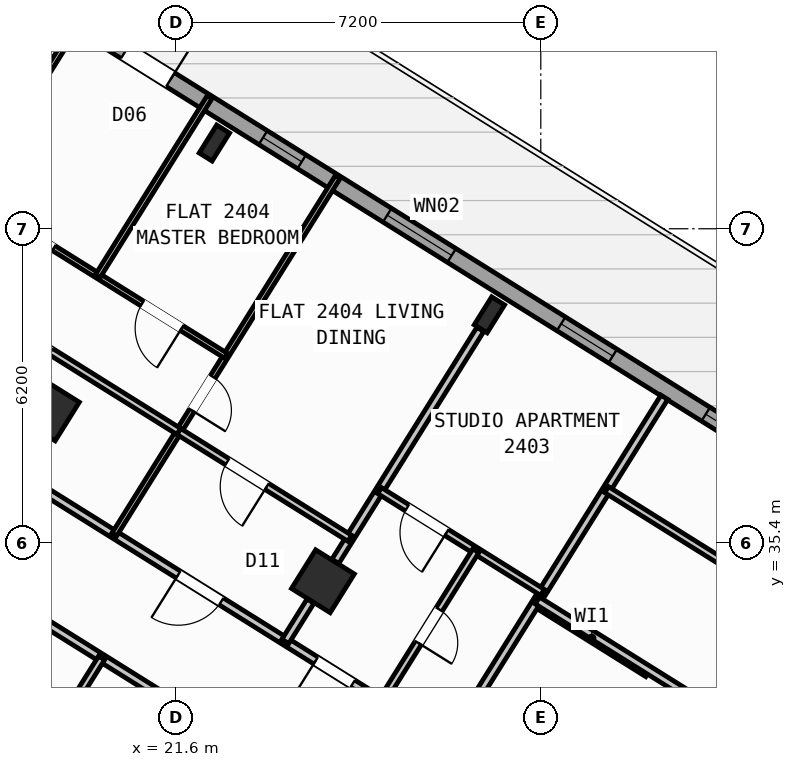
"""IFC4 building model, lengths in metres.
Left out: names, types, materials, properties, quantities, classifications, styles, units other than length and angle.
Written with IfcOpenShell. Run it as: python <this file> out.ifc"""

import sys

from ifc_helpers import new_model, si_unit, direction, frame, frame_2d, origin, origin_2d, place, context, subcontext, project, spatial, rectangle, hollow_rectangle, i_section, extrude, source, transform, mapped, element, fill, save


model = new_model("IFC4")
c1 = context("Model", 3, precision=1e-05, world=origin(), true_north=direction((0.0, 1.0)))
c2 = subcontext(c1, "Body", "Model", "MODEL_VIEW")
j1 = project(units=[si_unit("LENGTHUNIT", "METRE"), si_unit("PLANEANGLEUNIT", "RADIAN")], contexts=[c1])
p1 = place(None, origin())
s1 = spatial("IfcSite", under=j1, at=p1, CompositionType="ELEMENT")
p2 = place(p1, origin())
s2 = spatial("IfcBuilding", under=s1, at=p2, CompositionType="ELEMENT")
p3 = place(p2, frame((0.0, 0.0, 97.2)))
s3 = spatial("IfcBuildingStorey", under=s2, at=p3, CompositionType="ELEMENT", Elevation=97.2)
m1 = source(origin(), c2, "Body", "SweptSolid", [
    extrude(i_section(OverallWidth=0.3, OverallDepth=0.65, WebThickness=0.016, FlangeThickness=0.031, at=origin_2d()), origin(), (0.0, 0.0, 1.0), 3.6),
])
p4 = place(p3, frame((27.786, 39.901, 0.0), z_axis=(0.0, 0.0, 1.0), x_axis=(-0.848048096156, 0.529919264233, 0.0)))
e1 = element("IfcColumn", 1, at=p4, inside=s3, PredefinedType="COLUMN", context=c2, shape_type="MappedRepresentation", body=[
    mapped(m1, transform((0.0, 0.0, 0.0), scale=1.0)),
])
m2 = source(origin(), c2, "Body", "SweptSolid", [
    extrude(hollow_rectangle(XDim=0.9, YDim=0.9, WallThickness=0.036, at=origin_2d()), origin(), (0.0, 0.0, 1.0), 3.6),
])
p5 = place(p3, frame((24.5, 34.643, 0.0), z_axis=(0.0, 0.0, 1.0), x_axis=(-0.848048096156, 0.529919264233, 0.0)))
e2 = element("IfcColumn", 2, at=p5, inside=s3, PredefinedType="COLUMN", context=c2, shape_type="MappedRepresentation", body=[
    mapped(m2, transform((0.0, 0.0, 0.0), scale=1.0)),
])
p6 = place(p3, frame((22.358, 43.292, 0.0), z_axis=(0.0, 0.0, 1.0), x_axis=(-0.848048096156, 0.529919264233, 0.0)))
e3 = element("IfcColumn", 3, at=p6, inside=s3, PredefinedType="COLUMN", context=c2, shape_type="MappedRepresentation", body=[
    mapped(m1, transform((0.0, 0.0, 0.0), scale=1.0)),
])
p7 = place(p3, frame((19.073, 38.034, 0.0), z_axis=(0.0, 0.0, 1.0), x_axis=(-0.848048096156, 0.529919264233, 0.0)))
e4 = element("IfcColumn", 4, at=p7, inside=s3, PredefinedType="COLUMN", context=c2, shape_type="MappedRepresentation", body=[
    mapped(m2, transform((0.0, 0.0, 0.0), scale=1.0)),
])
p8 = place(p3, frame((17.424, 47.083, 0.0), z_axis=(0.0, 0.0, 1.0), x_axis=(0.848049927979, -0.529916332693, 0.0)))
e5 = element("IfcWall", 5, at=p8, inside=s3, PredefinedType="STANDARD", context=c2, shape_type="SweptSolid", body=[
    extrude(rectangle(XDim=29.223, YDim=0.32, at=frame_2d((14.612, 0.0))), origin(), (0.0, 0.0, 1.0), 3.32),
])
p9 = place(p8, frame((3.745, 0.0, 0.0)))
e6 = element("IfcOpeningElement", 6, at=p9, cuts=e5, PredefinedType="OPENING", context=c2, shape_type="SweptSolid", body=[
    extrude(rectangle(XDim=1.05, YDim=2.15, at=frame_2d((0.525, 1.075))), frame((0.0, 0.17, 0.0), z_axis=(0.0, -1.0, 0.0), x_axis=(1.0, 0.0, 0.0)), (0.0, 0.0, 1.0), 0.34),
])
p10 = place(p8, frame((0.699, 0.0, 0.95)))
e7 = element("IfcOpeningElement", 7, at=p10, cuts=e5, PredefinedType="OPENING", context=c2, shape_type="SweptSolid", body=[
    extrude(rectangle(XDim=1.2, YDim=1.4, at=frame_2d((0.6, 0.7))), frame((0.0, 0.17, 0.0), z_axis=(0.0, -1.0, 0.0), x_axis=(1.0, 0.0, 0.0)), (0.0, 0.0, 1.0), 0.34),
])
p11 = place(p8, frame((6.951, 0.0, 1.0)))
e8 = element("IfcOpeningElement", 8, at=p11, cuts=e5, PredefinedType="OPENING", context=c2, shape_type="SweptSolid", body=[
    extrude(rectangle(XDim=0.9, YDim=1.25, at=frame_2d((0.45, 0.625))), frame((0.0, 0.17, 0.0), z_axis=(0.0, -1.0, 0.0), x_axis=(1.0, 0.0, 0.0)), (0.0, 0.0, 1.0), 0.34),
])
p12 = place(p8, frame((9.841, 0.0, 0.85)))
e9 = element("IfcOpeningElement", 9, at=p12, cuts=e5, PredefinedType="OPENING", context=c2, shape_type="SweptSolid", body=[
    extrude(rectangle(XDim=1.5, YDim=1.5, at=frame_2d((0.75, 0.75))), frame((0.0, 0.17, 0.0), z_axis=(0.0, -1.0, 0.0), x_axis=(1.0, 0.0, 0.0)), (0.0, 0.0, 1.0), 0.34),
])
p13 = place(p8, frame((13.889, 0.0, 0.95)))
e10 = element("IfcOpeningElement", 10, at=p13, cuts=e5, PredefinedType="OPENING", context=c2, shape_type="SweptSolid", body=[
    extrude(rectangle(XDim=1.2, YDim=1.4, at=frame_2d((0.6, 0.7))), frame((0.0, 0.17, 0.0), z_axis=(0.0, -1.0, 0.0), x_axis=(1.0, 0.0, 0.0)), (0.0, 0.0, 1.0), 0.34),
])
p14 = place(p8, frame((17.254, 0.0, 1.0)))
e11 = element("IfcOpeningElement", 11, at=p14, cuts=e5, PredefinedType="OPENING", context=c2, shape_type="SweptSolid", body=[
    extrude(rectangle(XDim=0.9, YDim=1.25, at=frame_2d((0.45, 0.625))), frame((0.0, 0.17, 0.0), z_axis=(0.0, -1.0, 0.0), x_axis=(1.0, 0.0, 0.0)), (0.0, 0.0, 1.0), 0.34),
])
p15 = place(p8, frame((20.764, 0.0, 0.8)))
e12 = element("IfcOpeningElement", 12, at=p15, cuts=e5, PredefinedType="OPENING", context=c2, shape_type="SweptSolid", body=[
    extrude(rectangle(XDim=2.1, YDim=1.55, at=frame_2d((1.05, 0.775))), frame((0.0, 0.17, 0.0), z_axis=(0.0, -1.0, 0.0), x_axis=(1.0, 0.0, 0.0)), (0.0, 0.0, 1.0), 0.34),
])
p16 = place(p8, frame((25.403, 0.0, 0.8)))
e13 = element("IfcOpeningElement", 13, at=p16, cuts=e5, PredefinedType="OPENING", context=c2, shape_type="SweptSolid", body=[
    extrude(rectangle(XDim=2.1, YDim=1.55, at=frame_2d((1.05, 0.775))), frame((0.0, 0.17, 0.0), z_axis=(0.0, -1.0, 0.0), x_axis=(1.0, 0.0, 0.0)), (0.0, 0.0, 1.0), 0.34),
])
p17 = place(p3, frame((30.914, 32.829, 0.0), z_axis=(0.0, 0.0, 1.0), x_axis=(-0.848008813643, 0.529982124211, 0.0)))
e14 = element("IfcWall", 14, at=p17, inside=s3, PredefinedType="PARTITIONING", context=c2, shape_type="SweptSolid", body=[
    extrude(rectangle(XDim=2.61, YDim=0.16, at=frame_2d((1.305, 0.0))), origin(), (0.0, 0.0, 1.0), 3.31),
])
p18 = place(p3, frame((31.239, 38.274, 0.0), z_axis=(0.0, 0.0, 1.0), x_axis=(-0.529928058306, -0.848042600947, 0.0)))
e15 = element("IfcWall", 15, at=p18, inside=s3, PredefinedType="PARTITIONING", context=c2, shape_type="SweptSolid", body=[
    extrude(rectangle(XDim=8.05, YDim=0.16, at=frame_2d((4.025, 0.0))), origin(), (0.0, 0.0, 1.0), 3.31),
])
p19 = place(p3, frame((26.973, 31.447, 0.0), z_axis=(0.0, 0.0, 1.0), x_axis=(-0.848048310262, 0.529918921593, 0.0)))
e16 = element("IfcWall", 16, at=p19, inside=s3, PredefinedType="PARTITIONING", context=c2, shape_type="SweptSolid", body=[
    extrude(rectangle(XDim=16.73, YDim=0.16, at=frame_2d((8.365, 0.0))), origin(), (0.0, 0.0, 1.0), 3.31),
])
p20 = place(p19, frame((2.22, 0.0, 0.0)))
e17 = element("IfcOpeningElement", 17, at=p20, cuts=e16, PredefinedType="OPENING", context=c2, shape_type="SweptSolid", body=[
    extrude(rectangle(XDim=0.86, YDim=2.05, at=frame_2d((0.43, 1.025))), frame((0.0, 0.09, 0.0), z_axis=(0.0, -1.0, 0.0), x_axis=(1.0, 0.0, 0.0)), (0.0, 0.0, 1.0), 0.18),
])
p21 = place(p19, frame((5.28, 0.0, 0.0)))
e18 = element("IfcOpeningElement", 18, at=p21, cuts=e16, PredefinedType="OPENING", context=c2, shape_type="SweptSolid", body=[
    extrude(rectangle(XDim=1.0, YDim=2.1, at=frame_2d((0.5, 1.05))), frame((0.0, 0.09, 0.0), z_axis=(0.0, -1.0, 0.0), x_axis=(1.0, 0.0, 0.0)), (0.0, 0.0, 1.0), 0.18),
])
p22 = place(p3, frame((25.807, 29.582, 0.0), z_axis=(0.0, 0.0, 1.0), x_axis=(-0.848052408131, 0.529912363569, 0.0)))
e19 = element("IfcWall", 19, at=p22, inside=s3, PredefinedType="PARTITIONING", context=c2, shape_type="SweptSolid", body=[
    extrude(rectangle(XDim=16.73, YDim=0.16, at=frame_2d((8.365, 0.0))), origin(), (0.0, 0.0, 1.0), 3.31),
])
p23 = place(p22, frame((2.22, 0.0, 0.0)))
e20 = element("IfcOpeningElement", 20, at=p23, cuts=e19, PredefinedType="OPENING", context=c2, shape_type="SweptSolid", body=[
    extrude(rectangle(XDim=0.86, YDim=2.05, at=frame_2d((0.43, 1.025))), frame((0.0, 0.09, 0.0), z_axis=(0.0, -1.0, 0.0), x_axis=(1.0, 0.0, 0.0)), (0.0, 0.0, 1.0), 0.18),
])
p24 = place(p22, frame((14.013, 0.0, 0.0)))
e21 = element("IfcOpeningElement", 21, at=p24, cuts=e19, PredefinedType="OPENING", context=c2, shape_type="SweptSolid", body=[
    extrude(rectangle(XDim=1.0, YDim=2.1, at=frame_2d((0.5, 1.05))), frame((0.0, 0.09, 0.0), z_axis=(0.0, -1.0, 0.0), x_axis=(1.0, 0.0, 0.0)), (0.0, 0.0, 1.0), 0.18),
])
p25 = place(p3, frame((21.321, 29.554, 0.0), z_axis=(0.0, 0.0, 1.0), x_axis=(-0.84803529765, 0.529939745575, 0.0)))
e22 = element("IfcWall", 22, at=p25, inside=s3, PredefinedType="PLUMBINGWALL", context=c2, shape_type="SweptSolid", body=[
    extrude(rectangle(XDim=8.527, YDim=0.14, at=frame_2d((4.264, 0.0))), origin(), (0.0, 0.0, 1.0), 3.31),
])
p26 = place(p25, frame((5.155, 0.0, 0.0)))
e23 = element("IfcOpeningElement", 23, at=p26, cuts=e22, PredefinedType="OPENING", context=c2, shape_type="SweptSolid", body=[
    extrude(rectangle(XDim=0.78, YDim=2.05, at=frame_2d((0.39, 1.025))), frame((0.0, 0.08, 0.0), z_axis=(0.0, -1.0, 0.0), x_axis=(1.0, 0.0, 0.0)), (0.0, 0.0, 1.0), 0.16),
])
p27 = place(p25, frame((1.011, 0.0, 0.0)))
e24 = element("IfcOpeningElement", 24, at=p27, cuts=e22, PredefinedType="OPENING", context=c2, shape_type="SweptSolid", body=[
    extrude(rectangle(XDim=0.78, YDim=2.05, at=frame_2d((0.39, 1.025))), frame((0.0, 0.08, 0.0), z_axis=(0.0, -1.0, 0.0), x_axis=(1.0, 0.0, 0.0)), (0.0, 0.0, 1.0), 0.16),
])
p28 = place(p3, frame((20.132, 33.128, 0.0), z_axis=(0.0, 0.0, 1.0), x_axis=(-0.529935194983, -0.848038141311, 0.0)))
e25 = element("IfcWall", 25, at=p28, inside=s3, PredefinedType="PLUMBINGWALL", context=c2, shape_type="SweptSolid", body=[
    extrude(rectangle(XDim=2.41, YDim=0.14, at=frame_2d((1.205, 0.0))), origin(), (0.0, 0.0, 1.0), 3.31),
])
p29 = place(p3, frame((27.607, 39.615, 0.0), z_axis=(0.0, 0.0, 1.0), x_axis=(-0.529913610495, -0.848051628978, 0.0)))
e26 = element("IfcWall", 26, at=p29, inside=s3, PredefinedType="PARTITIONING", context=c2, shape_type="SweptSolid", body=[
    extrude(rectangle(XDim=5.401, YDim=0.16, at=frame_2d((2.7, 0.0))), origin(), (0.0, 0.0, 1.0), 2.745),
])
p30 = place(p3, frame((24.256, 34.251, 0.0), z_axis=(0.0, 0.0, 1.0), x_axis=(-0.529952145338, -0.848027548876, 0.0)))
e27 = element("IfcWall", 27, at=p30, inside=s3, PredefinedType="PARTITIONING", context=c2, shape_type="SweptSolid", body=[
    extrude(rectangle(XDim=0.938, YDim=0.16, at=frame_2d((0.469, 0.0))), origin(), (0.0, 0.0, 1.0), 2.745),
])
p31 = place(p3, frame((28.833, 34.424, 0.0), z_axis=(0.0, 0.0, 1.0), x_axis=(-0.848059820872, 0.529900500304, 0.0)))
e28 = element("IfcWall", 28, at=p31, inside=s3, PredefinedType="PLUMBINGWALL", context=c2, shape_type="SweptSolid", body=[
    extrude(rectangle(XDim=3.79, YDim=0.14, at=frame_2d((1.895, 0.0))), origin(), (0.0, 0.0, 1.0), 3.31),
])
p32 = place(p31, frame((2.23, 0.0, 0.0)))
e29 = element("IfcOpeningElement", 29, at=p32, cuts=e28, PredefinedType="OPENING", context=c2, shape_type="SweptSolid", body=[
    extrude(rectangle(XDim=0.92, YDim=2.08, at=frame_2d((0.46, 1.04))), frame((0.0, 0.08, 0.0), z_axis=(0.0, -1.0, 0.0), x_axis=(1.0, 0.0, 0.0)), (0.0, 0.0, 1.0), 0.16),
])
p33 = place(p3, frame((27.518, 35.245, 0.0), z_axis=(0.0, 0.0, 1.0), x_axis=(-0.529948921118, -0.848029563757, 0.0)))
e30 = element("IfcWall", 30, at=p33, inside=s3, PredefinedType="PLUMBINGWALL", context=c2, shape_type="SweptSolid", body=[
    extrude(rectangle(XDim=3.51, YDim=0.14, at=frame_2d((1.755, 0.0))), origin(), (0.0, 0.0, 1.0), 2.935),
])
p34 = place(p33, frame((1.365, 0.0, 0.0)))
e31 = element("IfcOpeningElement", 31, at=p34, cuts=e30, PredefinedType="OPENING", context=c2, shape_type="SweptSolid", body=[
    extrude(rectangle(XDim=0.78, YDim=2.05, at=frame_2d((0.39, 1.025))), frame((0.0, 0.08, 0.0), z_axis=(0.0, -1.0, 0.0), x_axis=(1.0, 0.0, 0.0)), (0.0, 0.0, 1.0), 0.16),
])
p35 = place(p3, frame((24.792, 42.62, 0.0), z_axis=(0.0, 0.0, 1.0), x_axis=(-0.529925083182, -0.848044460046, 0.0)))
e32 = element("IfcWall", 32, at=p35, inside=s3, PredefinedType="PARTITIONING", context=c2, shape_type="SweptSolid", body=[
    extrude(rectangle(XDim=8.32, YDim=0.11, at=frame_2d((4.16, 0.0))), origin(), (0.0, 0.0, 1.0), 3.31),
])
p36 = place(p35, frame((4.65, 0.0, 0.0)))
e33 = element("IfcOpeningElement", 33, at=p36, cuts=e32, PredefinedType="OPENING", context=c2, shape_type="SweptSolid", body=[
    extrude(rectangle(XDim=0.78, YDim=2.05, at=frame_2d((0.39, 1.025))), frame((0.0, 0.065, 0.0), z_axis=(0.0, -1.0, 0.0), x_axis=(1.0, 0.0, 0.0)), (0.0, 0.0, 1.0), 0.13),
])
p37 = place(p3, frame((25.03, 35.491, 0.0), z_axis=(0.0, 0.0, 1.0), x_axis=(-0.848070667369, 0.52988314103, 0.0)))
e34 = element("IfcWall", 34, at=p37, inside=s3, PredefinedType="PLUMBINGWALL", context=c2, shape_type="SweptSolid", body=[
    extrude(rectangle(XDim=3.98, YDim=0.14, at=frame_2d((1.99, 0.0))), origin(), (0.0, 0.0, 1.0), 3.31),
])
p38 = place(p37, frame((1.93, 0.0, 0.0)))
e35 = element("IfcOpeningElement", 35, at=p38, cuts=e34, PredefinedType="OPENING", context=c2, shape_type="SweptSolid", body=[
    extrude(rectangle(XDim=0.92, YDim=2.08, at=frame_2d((0.46, 1.04))), frame((0.0, 0.08, 0.0), z_axis=(0.0, -1.0, 0.0), x_axis=(1.0, 0.0, 0.0)), (0.0, 0.0, 1.0), 0.16),
])
p39 = place(p3, frame((21.655, 37.6, 0.0), z_axis=(0.0, 0.0, 1.0), x_axis=(-0.848044326704, 0.52992529657, 0.0)))
e36 = element("IfcWall", 36, at=p39, inside=s3, PredefinedType="PLUMBINGWALL", context=c2, shape_type="SweptSolid", body=[
    extrude(rectangle(XDim=8.94, YDim=0.14, at=frame_2d((4.47, 0.0))), origin(), (0.0, 0.0, 1.0), 3.31),
])
p40 = place(p39, frame((2.972, 0.0, 0.0)))
e37 = element("IfcOpeningElement", 37, at=p40, cuts=e36, PredefinedType="OPENING", context=c2, shape_type="SweptSolid", body=[
    extrude(rectangle(XDim=0.78, YDim=2.05, at=frame_2d((0.39, 1.025))), frame((0.0, 0.08, 0.0), z_axis=(0.0, -1.0, 0.0), x_axis=(1.0, 0.0, 0.0)), (0.0, 0.0, 1.0), 0.16),
])
p41 = place(p39, frame((6.843, 0.0, 0.0)))
e38 = element("IfcOpeningElement", 38, at=p41, cuts=e36, PredefinedType="OPENING", context=c2, shape_type="SweptSolid", body=[
    extrude(rectangle(XDim=0.78, YDim=2.05, at=frame_2d((0.39, 1.025))), frame((0.0, 0.08, 0.0), z_axis=(0.0, -1.0, 0.0), x_axis=(1.0, 0.0, 0.0)), (0.0, 0.0, 1.0), 0.16),
])
p42 = place(p3, frame((22.588, 39.093, 0.0), z_axis=(0.0, 0.0, 1.0), x_axis=(-0.848044326704, 0.52992529657, 0.0)))
e39 = element("IfcWall", 39, at=p42, inside=s3, PredefinedType="PARTITIONING", context=c2, shape_type="SweptSolid", body=[
    extrude(rectangle(XDim=8.94, YDim=0.11, at=frame_2d((4.47, 0.0))), origin(), (0.0, 0.0, 1.0), 3.31),
])
p43 = place(p42, frame((1.03, 0.0, 0.0)))
e40 = element("IfcOpeningElement", 40, at=p43, cuts=e39, PredefinedType="OPENING", context=c2, shape_type="SweptSolid", body=[
    extrude(rectangle(XDim=0.92, YDim=2.08, at=frame_2d((0.46, 1.04))), frame((0.0, 0.065, 0.0), z_axis=(0.0, -1.0, 0.0), x_axis=(1.0, 0.0, 0.0)), (0.0, 0.0, 1.0), 0.13),
])
p44 = place(p42, frame((4.01, 0.0, 0.0)))
e41 = element("IfcOpeningElement", 41, at=p44, cuts=e39, PredefinedType="OPENING", context=c2, shape_type="SweptSolid", body=[
    extrude(rectangle(XDim=0.92, YDim=2.08, at=frame_2d((0.46, 1.04))), frame((0.0, 0.065, 0.0), z_axis=(0.0, -1.0, 0.0), x_axis=(1.0, 0.0, 0.0)), (0.0, 0.0, 1.0), 0.13),
])
p45 = place(p42, frame((6.99, 0.0, 0.0)))
e42 = element("IfcOpeningElement", 42, at=p45, cuts=e39, PredefinedType="OPENING", context=c2, shape_type="SweptSolid", body=[
    extrude(rectangle(XDim=0.92, YDim=2.08, at=frame_2d((0.46, 1.04))), frame((0.0, 0.065, 0.0), z_axis=(0.0, -1.0, 0.0), x_axis=(1.0, 0.0, 0.0)), (0.0, 0.0, 1.0), 0.13),
])
p46 = place(p3, frame((22.265, 44.199, 0.0), z_axis=(0.0, 0.0, 1.0), x_axis=(-0.529946186362, -0.848031272749, 0.0)))
e43 = element("IfcWall", 43, at=p46, inside=s3, PredefinedType="PARTITIONING", context=c2, shape_type="SweptSolid", body=[
    extrude(rectangle(XDim=4.16, YDim=0.11, at=frame_2d((2.08, 0.0))), origin(), (0.0, 0.0, 1.0), 3.31),
])
p47 = place(p3, frame((19.738, 45.779, 0.0), z_axis=(0.0, 0.0, 1.0), x_axis=(-0.529877605827, -0.848074125795, 0.0)))
e44 = element("IfcWall", 44, at=p47, inside=s3, PredefinedType="PARTITIONING", context=c2, shape_type="SweptSolid", body=[
    extrude(rectangle(XDim=4.16, YDim=0.11, at=frame_2d((2.08, 0.0))), origin(), (0.0, 0.0, 1.0), 3.31),
])
p48 = place(p3, frame((41.936, 26.012, 0.0), z_axis=(0.0, 0.0, 1.0), x_axis=(-0.848051154596, 0.529914369676, 0.0)))
e45 = element("IfcWall", 45, at=p48, inside=s3, PredefinedType="PARTITIONING", context=c2, shape_type="SweptSolid", body=[
    extrude(rectangle(XDim=15.57, YDim=0.16, at=frame_2d((7.785, 0.0))), origin(), (0.0, 0.0, 1.0), 3.31),
])
p49 = place(p48, frame((10.83, 0.0, 0.0)))
e46 = element("IfcOpeningElement", 46, at=p49, cuts=e45, PredefinedType="OPENING", context=c2, shape_type="SweptSolid", body=[
    extrude(rectangle(XDim=1.0, YDim=2.1, at=frame_2d((0.5, 1.05))), frame((0.0, 0.09, 0.0), z_axis=(0.0, -1.0, 0.0), x_axis=(1.0, 0.0, 0.0)), (0.0, 0.0, 1.0), 0.18),
])
p50 = place(p3, frame((42.226, 28.873, 0.0), z_axis=(0.0, 0.0, 1.0), x_axis=(-0.848049134363, 0.529917602752, 0.0)))
e47 = element("IfcWall", 47, at=p50, inside=s3, PredefinedType="PLUMBINGWALL", context=c2, shape_type="SweptSolid", body=[
    extrude(rectangle(XDim=14.3, YDim=0.14, at=frame_2d((7.15, 0.0))), origin(), (0.0, 0.0, 1.0), 3.31),
])
p51 = place(p50, frame((9.57, 0.0, 0.0)))
e48 = element("IfcOpeningElement", 48, at=p51, cuts=e47, PredefinedType="OPENING", context=c2, shape_type="SweptSolid", body=[
    extrude(rectangle(XDim=0.92, YDim=2.08, at=frame_2d((0.46, 1.04))), frame((0.0, 0.08, 0.0), z_axis=(0.0, -1.0, 0.0), x_axis=(1.0, 0.0, 0.0)), (0.0, 0.0, 1.0), 0.16),
])
m3 = source(origin(), c2, "Body", "SweptSolid", [
    extrude(rectangle(XDim=1.05, YDim=2.15, at=frame_2d((0.525, 1.075))), frame((0.0, 0.025, 0.0), z_axis=(0.0, -1.0, 0.0), x_axis=(1.0, 0.0, 0.0)), (0.0, 0.0, 1.0), 0.05),
])
p52 = place(p9, origin())
e49 = element("IfcDoor", 49, at=p52, inside=s3, OperationType="SINGLE_SWING_RIGHT", PredefinedType="DOOR", context=c2, shape_type="MappedRepresentation", body=[
    mapped(m3, transform((0.0, 0.0, 0.0), scale=1.0)),
])
fill(e6, e49)
m4 = source(origin(), c2, "Body", "SweptSolid", [
    extrude(rectangle(XDim=0.9, YDim=1.25, at=frame_2d((0.45, 0.625))), frame((0.0, 0.03, 0.0), z_axis=(0.0, -1.0, 0.0), x_axis=(1.0, 0.0, 0.0)), (0.0, 0.0, 1.0), 0.06),
])
p53 = place(p11, origin())
e50 = element("IfcWindow", 50, at=p53, inside=s3, PartitioningType="SINGLE_PANEL", PredefinedType="WINDOW", context=c2, shape_type="MappedRepresentation", body=[
    mapped(m4, transform((0.0, 0.0, 0.0), scale=1.0)),
])
fill(e8, e50)
m5 = source(origin(), c2, "Body", "SweptSolid", [
    extrude(rectangle(XDim=1.5, YDim=1.5, at=frame_2d((0.75, 0.75))), frame((0.0, 0.03, 0.0), z_axis=(0.0, -1.0, 0.0), x_axis=(1.0, 0.0, 0.0)), (0.0, 0.0, 1.0), 0.06),
])
p54 = place(p12, origin())
e51 = element("IfcWindow", 51, at=p54, inside=s3, PartitioningType="SINGLE_PANEL", PredefinedType="WINDOW", context=c2, shape_type="MappedRepresentation", body=[
    mapped(m5, transform((0.0, 0.0, 0.0), scale=1.0)),
])
fill(e9, e51)
m6 = source(origin(), c2, "Body", "SweptSolid", [
    extrude(rectangle(XDim=1.2, YDim=1.4, at=frame_2d((0.6, 0.7))), frame((0.0, 0.03, 0.0), z_axis=(0.0, -1.0, 0.0), x_axis=(1.0, 0.0, 0.0)), (0.0, 0.0, 1.0), 0.06),
])
p55 = place(p13, origin())
e52 = element("IfcWindow", 52, at=p55, inside=s3, PartitioningType="SINGLE_PANEL", PredefinedType="WINDOW", context=c2, shape_type="MappedRepresentation", body=[
    mapped(m6, transform((0.0, 0.0, 0.0), scale=1.0)),
])
fill(e10, e52)
p56 = place(p14, origin())
e53 = element("IfcWindow", 53, at=p56, inside=s3, PartitioningType="SINGLE_PANEL", PredefinedType="WINDOW", context=c2, shape_type="MappedRepresentation", body=[
    mapped(m4, transform((0.0, 0.0, 0.0), scale=1.0)),
])
fill(e11, e53)
m7 = source(origin(), c2, "Body", "SweptSolid", [
    extrude(rectangle(XDim=0.86, YDim=2.05, at=frame_2d((0.43, 1.025))), frame((0.0, 0.025, 0.0), z_axis=(0.0, -1.0, 0.0), x_axis=(1.0, 0.0, 0.0)), (0.0, 0.0, 1.0), 0.05),
])
p57 = place(p20, origin())
e54 = element("IfcDoor", 54, at=p57, inside=s3, OperationType="SINGLE_SWING_RIGHT", PredefinedType="DOOR", context=c2, shape_type="MappedRepresentation", body=[
    mapped(m7, transform((0.0, 0.0, 0.0), scale=1.0)),
])
fill(e17, e54)
m8 = source(origin(), c2, "Body", "SweptSolid", [
    extrude(rectangle(XDim=0.92, YDim=2.08, at=frame_2d((0.46, 1.04))), frame((0.0, 0.025, 0.0), z_axis=(0.0, -1.0, 0.0), x_axis=(1.0, 0.0, 0.0)), (0.0, 0.0, 1.0), 0.05),
])
p58 = place(p32, origin())
e55 = element("IfcDoor", 55, at=p58, inside=s3, OperationType="SINGLE_SWING_LEFT", PredefinedType="DOOR", context=c2, shape_type="MappedRepresentation", body=[
    mapped(m8, transform((0.0, 0.0, 0.0), scale=1.0)),
])
fill(e29, e55)
m9 = source(origin(), c2, "Body", "SweptSolid", [
    extrude(rectangle(XDim=0.78, YDim=2.05, at=frame_2d((0.39, 1.025))), frame((0.0, 0.025, 0.0), z_axis=(0.0, -1.0, 0.0), x_axis=(1.0, 0.0, 0.0)), (0.0, 0.0, 1.0), 0.05),
])
p59 = place(p34, origin())
e56 = element("IfcDoor", 56, at=p59, inside=s3, OperationType="SINGLE_SWING_RIGHT", PredefinedType="DOOR", context=c2, shape_type="MappedRepresentation", body=[
    mapped(m9, transform((0.0, 0.0, 0.0), scale=1.0)),
])
fill(e31, e56)
m10 = source(origin(), c2, "Body", "SweptSolid", [
    extrude(rectangle(XDim=1.0, YDim=2.1, at=frame_2d((0.5, 1.05))), frame((0.0, 0.025, 0.0), z_axis=(0.0, -1.0, 0.0), x_axis=(1.0, 0.0, 0.0)), (0.0, 0.0, 1.0), 0.05),
])
p60 = place(p21, origin())
e57 = element("IfcDoor", 57, at=p60, inside=s3, OperationType="SINGLE_SWING_RIGHT", PredefinedType="DOOR", context=c2, shape_type="MappedRepresentation", body=[
    mapped(m10, transform((0.0, 0.0, 0.0), scale=1.0)),
])
fill(e18, e57)
p61 = place(p38, origin())
e58 = element("IfcDoor", 58, at=p61, inside=s3, OperationType="SINGLE_SWING_LEFT", PredefinedType="DOOR", context=c2, shape_type="MappedRepresentation", body=[
    mapped(m8, transform((0.0, 0.0, 0.0), scale=1.0)),
])
fill(e35, e58)
p62 = place(p36, origin())
e59 = element("IfcDoor", 59, at=p62, inside=s3, OperationType="SINGLE_SWING_RIGHT", PredefinedType="DOOR", context=c2, shape_type="MappedRepresentation", body=[
    mapped(m9, transform((0.0, 0.0, 0.0), scale=1.0)),
])
fill(e33, e59)
p63 = place(p43, origin())
e60 = element("IfcDoor", 60, at=p63, inside=s3, OperationType="SINGLE_SWING_LEFT", PredefinedType="DOOR", context=c2, shape_type="MappedRepresentation", body=[
    mapped(m8, transform((0.0, 0.0, 0.0), scale=1.0)),
])
fill(e40, e60)
p64 = place(p44, origin())
e61 = element("IfcDoor", 61, at=p64, inside=s3, OperationType="SINGLE_SWING_RIGHT", PredefinedType="DOOR", context=c2, shape_type="MappedRepresentation", body=[
    mapped(m8, transform((0.0, 0.0, 0.0), scale=1.0)),
])
fill(e41, e61)
save(model, sys.argv[1])
